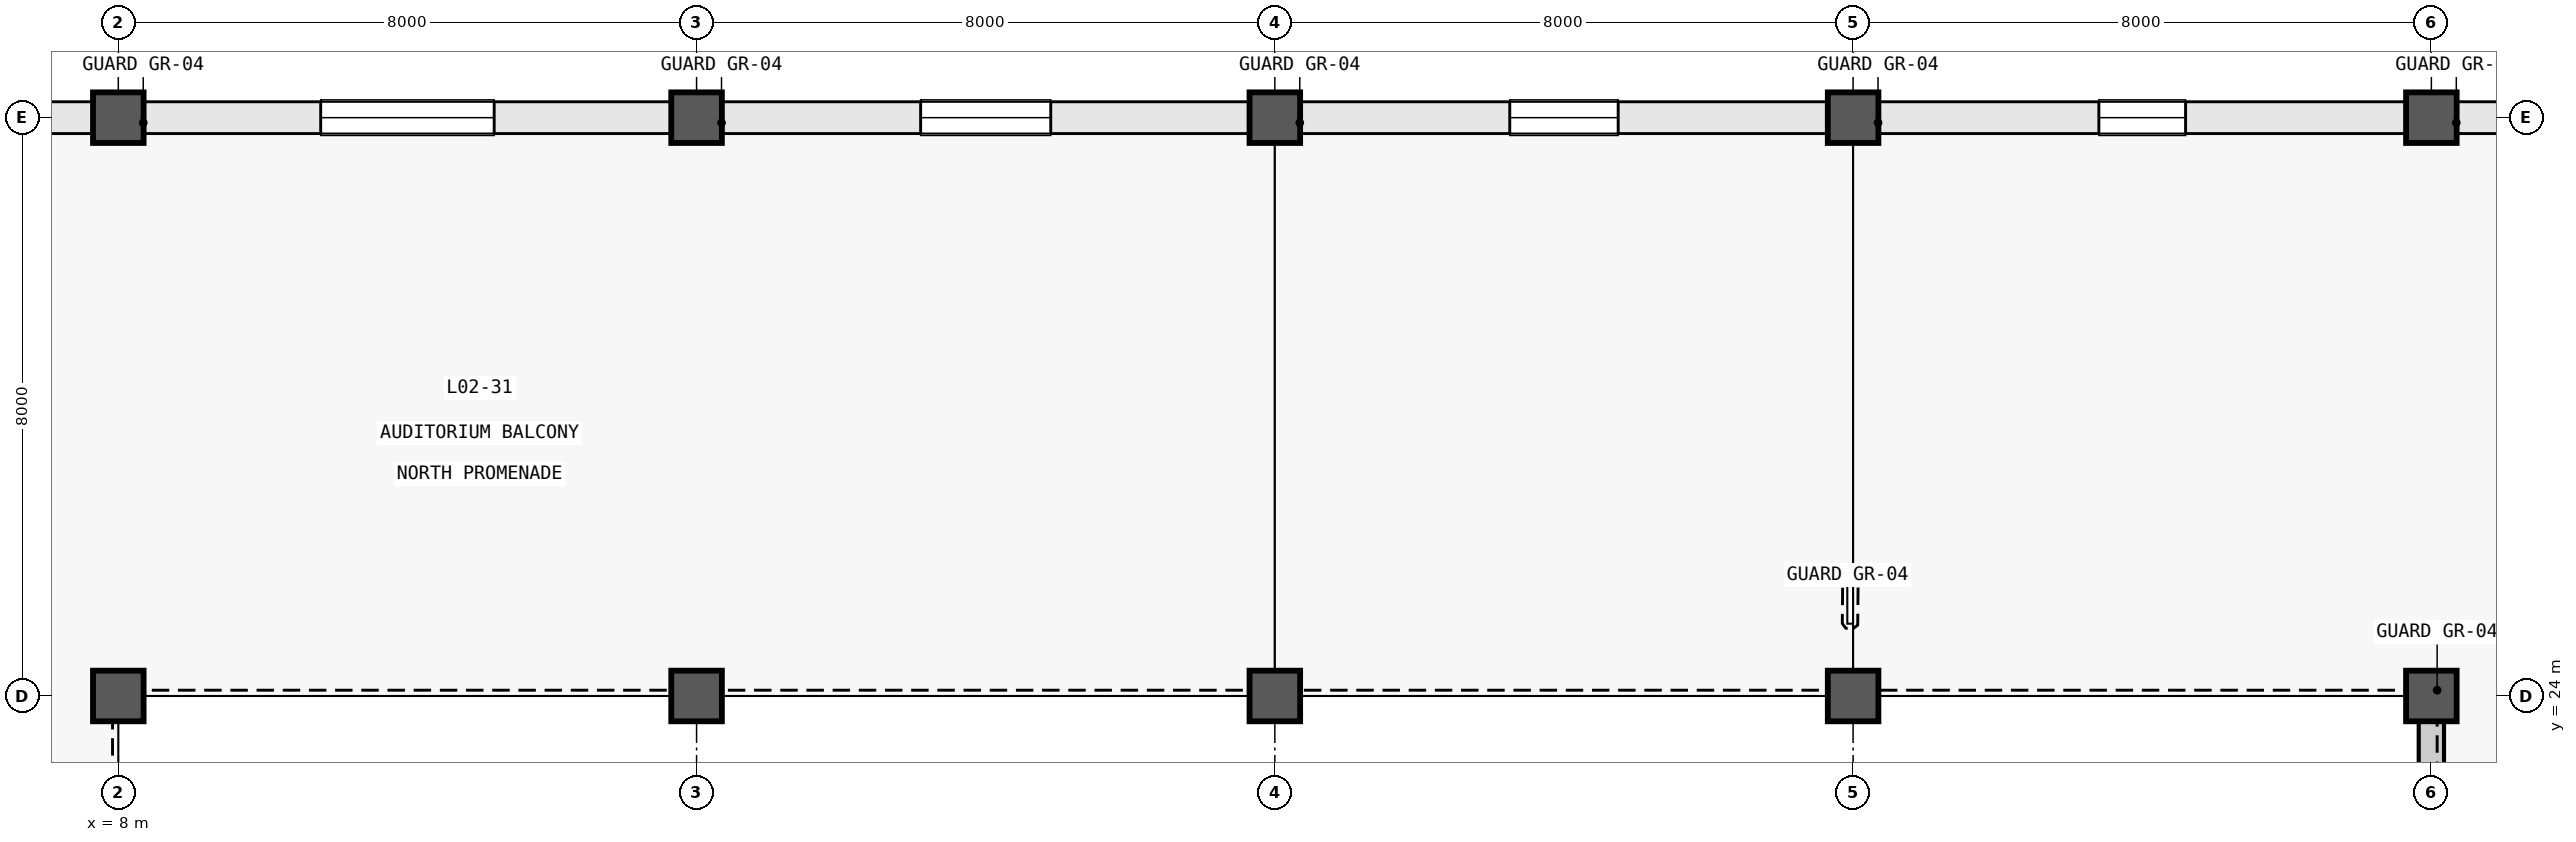
"""IFC4 building model, lengths in metres.
Left out: names, types, materials, properties, quantities, classifications, styles, units other than length and angle.
Written with IfcOpenShell. Run it as: python <this file> out.ifc"""

import sys

from ifc_helpers import new_model, si_unit, direction, frame, frame_2d, origin, origin_2d, place, context, subcontext, project, spatial, rectangle, extrude, element, fill, save


model = new_model("IFC4")
c1 = context("Model", 3, precision=1e-05, world=origin(), true_north=direction((0.0, 1.0)))
c2 = subcontext(c1, "Body", "Model", "MODEL_VIEW")
j1 = project(units=[si_unit("LENGTHUNIT", "METRE"), si_unit("PLANEANGLEUNIT", "RADIAN")], contexts=[c1])
p1 = place(None, origin())
s1 = spatial("IfcSite", under=j1, at=p1, CompositionType="ELEMENT")
p2 = place(p1, origin())
s2 = spatial("IfcBuilding", under=s1, at=p2, CompositionType="ELEMENT")
p3 = place(p2, frame((0.0, 0.0, 5.4)))
s3 = spatial("IfcBuildingStorey", under=s2, at=p3, CompositionType="ELEMENT", Elevation=5.4)
for number, where, z_axis, x_axis in (
    (1, (8.0, 24.0, 0.0), (0.0, 0.0, 1.0), (1.0, 0.0, 0.0)),
    (2, (8.0, 32.0, 0.0), (0.0, 0.0, 1.0), (1.0, 0.0, 0.0)),
    (3, (16.0, 24.0, 0.0), (0.0, 0.0, 1.0), (1.0, 0.0, 0.0)),
    (4, (16.0, 32.0, 0.0), (0.0, 0.0, 1.0), (1.0, 0.0, 0.0)),
    (5, (24.0, 24.0, 0.0), (0.0, 0.0, 1.0), (1.0, 0.0, 0.0)),
    (6, (24.0, 32.0, 0.0), (0.0, 0.0, 1.0), (1.0, 0.0, 0.0)),
    (7, (32.0, 24.0, 0.0), (0.0, 0.0, 1.0), (1.0, 0.0, 0.0)),
    (8, (32.0, 32.0, 0.0), (0.0, 0.0, 1.0), (1.0, 0.0, 0.0)),
    (9, (40.0, 24.0, 0.0), (0.0, 0.0, 1.0), (1.0, 0.0, 0.0)),
    (10, (40.0, 32.0, 0.0), (0.0, 0.0, 1.0), (1.0, 0.0, 0.0)),
):
    element("IfcColumn", number, at=place(p3, frame(where, z_axis=z_axis, x_axis=x_axis)), inside=s3, PredefinedType="COLUMN", context=c2, shape_type="SweptSolid", body=[
        extrude(rectangle(XDim=0.7, YDim=0.7, at=origin_2d()), origin(), (0.0, 0.0, 1.0), 5.1),
    ])
p4 = place(p3, frame((40.0, 16.35, 0.0), z_axis=(0.0, 0.0, 1.0), x_axis=(0.0, 1.0, 0.0)))
e11 = element("IfcWall", 11, at=p4, inside=s3, PredefinedType="SHEAR", context=c2, shape_type="SweptSolid", body=[
    extrude(rectangle(XDim=7.3, YDim=0.35, at=frame_2d((3.65, 0.0))), origin(), (0.0, 0.0, 1.0), 4.76),
])
p5 = place(p3, frame((7.655, 32.0, 0.0), z_axis=(0.0, 0.0, 1.0), x_axis=(-1.0, 0.0, 0.0)))
e12 = element("IfcWall", 12, at=p5, inside=s3, PredefinedType="STANDARD", context=c2, shape_type="SweptSolid", body=[
    extrude(rectangle(XDim=7.31, YDim=0.44, at=frame_2d((3.655, 0.0))), origin(), (0.0, 0.0, 1.0), 3.64),
])
p6 = place(p5, frame((2.355, 0.0, 0.72)))
e13 = element("IfcOpeningElement", 13, at=p6, cuts=e12, PredefinedType="OPENING", context=c2, shape_type="SweptSolid", body=[
    extrude(rectangle(XDim=2.6, YDim=2.4, at=frame_2d((1.3, 1.2))), frame((0.0, 0.232, 0.0), z_axis=(0.0, -1.0, 0.0), x_axis=(1.0, 0.0, 0.0)), (0.0, 0.0, 1.0), 0.464),
])
p7 = place(p3, frame((15.655, 32.0, 0.0), z_axis=(0.0, 0.0, 1.0), x_axis=(-1.0, 0.0, 0.0)))
e14 = element("IfcWall", 14, at=p7, inside=s3, PredefinedType="STANDARD", context=c2, shape_type="SweptSolid", body=[
    extrude(rectangle(XDim=7.31, YDim=0.44, at=frame_2d((3.655, 0.0))), origin(), (0.0, 0.0, 1.0), 3.64),
])
p8 = place(p7, frame((2.455, 0.0, 0.72)))
e15 = element("IfcOpeningElement", 15, at=p8, cuts=e14, PredefinedType="OPENING", context=c2, shape_type="SweptSolid", body=[
    extrude(rectangle(XDim=2.4, YDim=2.6, at=frame_2d((1.2, 1.3))), frame((0.0, 0.232, 0.0), z_axis=(0.0, -1.0, 0.0), x_axis=(1.0, 0.0, 0.0)), (0.0, 0.0, 1.0), 0.464),
])
p9 = place(p3, frame((23.655, 32.0, 0.0), z_axis=(0.0, 0.0, 1.0), x_axis=(-1.0, 0.0, 0.0)))
e16 = element("IfcWall", 16, at=p9, inside=s3, PredefinedType="STANDARD", context=c2, shape_type="SweptSolid", body=[
    extrude(rectangle(XDim=7.31, YDim=0.44, at=frame_2d((3.655, 0.0))), origin(), (0.0, 0.0, 1.0), 3.64),
])
p10 = place(p9, frame((2.755, 0.0, 0.72)))
e17 = element("IfcOpeningElement", 17, at=p10, cuts=e16, PredefinedType="OPENING", context=c2, shape_type="SweptSolid", body=[
    extrude(rectangle(XDim=1.8, YDim=2.1, at=frame_2d((0.9, 1.05))), frame((0.0, 0.232, 0.0), z_axis=(0.0, -1.0, 0.0), x_axis=(1.0, 0.0, 0.0)), (0.0, 0.0, 1.0), 0.464),
])
p11 = place(p3, frame((31.655, 32.0, 0.0), z_axis=(0.0, 0.0, 1.0), x_axis=(-1.0, 0.0, 0.0)))
e18 = element("IfcWall", 18, at=p11, inside=s3, PredefinedType="STANDARD", context=c2, shape_type="SweptSolid", body=[
    extrude(rectangle(XDim=7.31, YDim=0.44, at=frame_2d((3.655, 0.0))), origin(), (0.0, 0.0, 1.0), 3.64),
])
p12 = place(p11, frame((2.905, 0.0, 0.72)))
e19 = element("IfcOpeningElement", 19, at=p12, cuts=e18, PredefinedType="OPENING", context=c2, shape_type="SweptSolid", body=[
    extrude(rectangle(XDim=1.5, YDim=1.8, at=frame_2d((0.75, 0.9))), frame((0.0, 0.232, 0.0), z_axis=(0.0, -1.0, 0.0), x_axis=(1.0, 0.0, 0.0)), (0.0, 0.0, 1.0), 0.464),
])
p13 = place(p3, frame((39.655, 32.0, 0.0), z_axis=(0.0, 0.0, 1.0), x_axis=(-1.0, 0.0, 0.0)))
e20 = element("IfcWall", 20, at=p13, inside=s3, PredefinedType="STANDARD", context=c2, shape_type="SweptSolid", body=[
    extrude(rectangle(XDim=7.31, YDim=0.44, at=frame_2d((3.655, 0.0))), origin(), (0.0, 0.0, 1.0), 3.64),
])
p14 = place(p13, frame((3.055, 0.0, 0.72)))
e21 = element("IfcOpeningElement", 21, at=p14, cuts=e20, PredefinedType="OPENING", context=c2, shape_type="SweptSolid", body=[
    extrude(rectangle(XDim=1.2, YDim=1.6, at=frame_2d((0.6, 0.8))), frame((0.0, 0.232, 0.0), z_axis=(0.0, -1.0, 0.0), x_axis=(1.0, 0.0, 0.0)), (0.0, 0.0, 1.0), 0.464),
])
p15 = place(p3, frame((47.655, 32.0, 0.0), z_axis=(0.0, 0.0, 1.0), x_axis=(-1.0, 0.0, 0.0)))
e22 = element("IfcWall", 22, at=p15, inside=s3, PredefinedType="STANDARD", context=c2, shape_type="SweptSolid", body=[
    extrude(rectangle(XDim=7.31, YDim=0.44, at=frame_2d((3.655, 0.0))), origin(), (0.0, 0.0, 1.0), 3.64),
])
p16 = place(p15, frame((2.155, 0.0, 0.72)))
e23 = element("IfcOpeningElement", 23, at=p16, cuts=e22, PredefinedType="OPENING", context=c2, shape_type="SweptSolid", body=[
    extrude(rectangle(XDim=3.0, YDim=2.1, at=frame_2d((1.5, 1.05))), frame((0.0, 0.232, 0.0), z_axis=(0.0, -1.0, 0.0), x_axis=(1.0, 0.0, 0.0)), (0.0, 0.0, 1.0), 0.464),
])
p17 = place(p8, origin())
e24 = element("IfcWindow", 24, at=p17, inside=s3, PartitioningType="SINGLE_PANEL", PredefinedType="WINDOW", context=c2, shape_type="SweptSolid", body=[
    extrude(rectangle(XDim=2.4, YDim=2.6, at=frame_2d((1.2, 1.3))), frame((0.0, 0.03, 0.0), z_axis=(0.0, -1.0, 0.0), x_axis=(1.0, 0.0, 0.0)), (0.0, 0.0, 1.0), 0.06),
])
fill(e15, e24)
p18 = place(p10, origin())
e25 = element("IfcWindow", 25, at=p18, inside=s3, PartitioningType="SINGLE_PANEL", PredefinedType="WINDOW", context=c2, shape_type="SweptSolid", body=[
    extrude(rectangle(XDim=1.8, YDim=2.1, at=frame_2d((0.9, 1.05))), frame((0.0, 0.03, 0.0), z_axis=(0.0, -1.0, 0.0), x_axis=(1.0, 0.0, 0.0)), (0.0, 0.0, 1.0), 0.06),
])
fill(e17, e25)
p19 = place(p12, origin())
e26 = element("IfcWindow", 26, at=p19, inside=s3, PartitioningType="SINGLE_PANEL", PredefinedType="WINDOW", context=c2, shape_type="SweptSolid", body=[
    extrude(rectangle(XDim=1.5, YDim=1.8, at=frame_2d((0.75, 0.9))), frame((0.0, 0.03, 0.0), z_axis=(0.0, -1.0, 0.0), x_axis=(1.0, 0.0, 0.0)), (0.0, 0.0, 1.0), 0.06),
])
fill(e19, e26)
p20 = place(p14, origin())
e27 = element("IfcWindow", 27, at=p20, inside=s3, PartitioningType="SINGLE_PANEL", PredefinedType="WINDOW", context=c2, shape_type="SweptSolid", body=[
    extrude(rectangle(XDim=1.2, YDim=1.6, at=frame_2d((0.6, 0.8))), frame((0.0, 0.03, 0.0), z_axis=(0.0, -1.0, 0.0), x_axis=(1.0, 0.0, 0.0)), (0.0, 0.0, 1.0), 0.06),
])
fill(e21, e27)
save(model, sys.argv[1])
